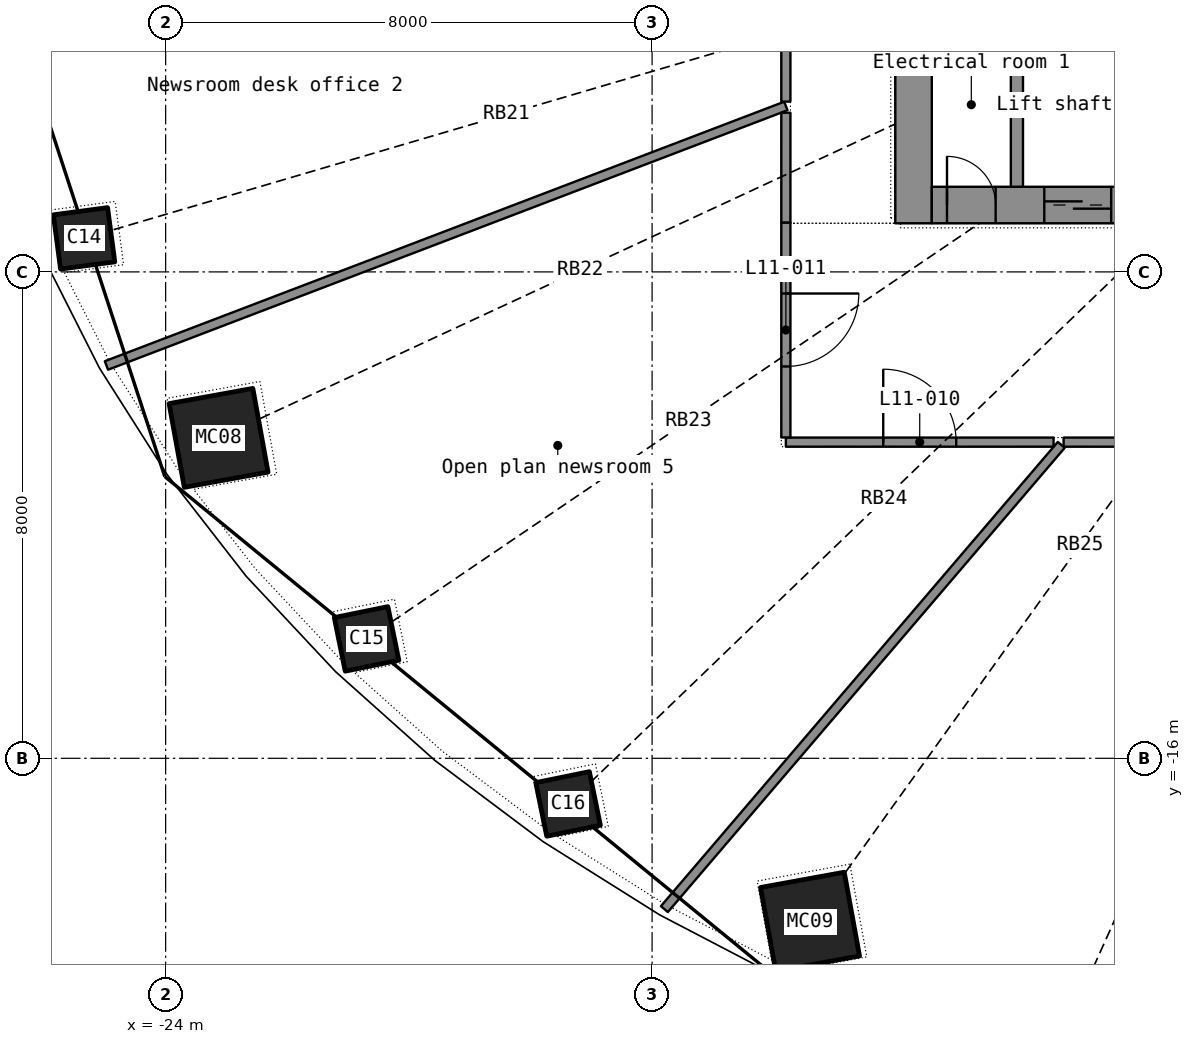
"""IFC4 building model, lengths in metres.
Left out: names, types, materials, properties, quantities, classifications, styles, units other than length and angle.
Written with IfcOpenShell. Run it as: python <this file> out.ifc"""

import sys

from ifc_helpers import new_model, si_unit, direction, frame, frame_2d, origin, origin_2d, place, context, subcontext, project, spatial, rectangle, hollow_rectangle, extrude, element, fill, save


model = new_model("IFC4")
c1 = context("Model", 3, precision=1e-05, world=origin(), true_north=direction((0.0, 1.0)))
c2 = subcontext(c1, "Body", "Model", "MODEL_VIEW")
j1 = project(units=[si_unit("LENGTHUNIT", "METRE"), si_unit("PLANEANGLEUNIT", "RADIAN")], contexts=[c1])
p1 = place(None, origin())
s1 = spatial("IfcSite", under=j1, at=p1, CompositionType="ELEMENT")
p2 = place(p1, origin())
s2 = spatial("IfcBuilding", under=s1, at=p2, CompositionType="ELEMENT")
p3 = place(p2, frame((0.0, 0.0, 51.9)))
s3 = spatial("IfcBuildingStorey", under=s2, at=p3, CompositionType="ELEMENT", Elevation=51.9)
p4 = place(p3, frame((-25.342, -7.448, 0.0), z_axis=(0.032509649, 0.009693546, 0.999424413), x_axis=(-0.409567466, 0.912268859, 0.004474349)))
e1 = element("IfcColumn", 1, at=p4, inside=s3, PredefinedType="COLUMN", context=c2, shape_type="SweptSolid", body=[
    extrude(hollow_rectangle(XDim=0.9, YDim=0.9, WallThickness=0.025, at=origin_2d()), origin(), (0.0, 0.0, 1.0), 3.702),
])
p5 = place(p3, frame((-23.13, -10.73, 0.0), z_axis=(0.029938721, 0.014112084, 0.999452111), x_axis=(-0.581020427, 0.813867496, 0.005912881)))
e2 = element("IfcColumn", 2, at=p5, inside=s3, PredefinedType="COLUMN", context=c2, shape_type="SweptSolid", body=[
    extrude(hollow_rectangle(XDim=1.4, YDim=1.4, WallThickness=0.04, at=origin_2d()), origin(), (0.0, 0.0, 1.0), 3.702),
])
p6 = place(p3, frame((-20.696, -14.036, 0.0), z_axis=(0.026510431, 0.018201192, 0.999482823), x_axis=(-0.719463139, 0.694500807, 0.006435864)))
e3 = element("IfcColumn", 3, at=p6, inside=s3, PredefinedType="COLUMN", context=c2, shape_type="SweptSolid", body=[
    extrude(hollow_rectangle(XDim=0.9, YDim=0.9, WallThickness=0.025, at=origin_2d()), origin(), (0.0, 0.0, 1.0), 3.702),
])
p7 = place(p3, frame((-17.382, -16.751, 0.0), z_axis=(0.02222469, 0.021697101, 0.999517533), x_axis=(-0.827695499, 0.561142971, 0.006223103)))
e4 = element("IfcColumn", 4, at=p7, inside=s3, PredefinedType="COLUMN", context=c2, shape_type="SweptSolid", body=[
    extrude(hollow_rectangle(XDim=0.9, YDim=0.9, WallThickness=0.025, at=origin_2d()), origin(), (0.0, 0.0, 1.0), 3.702),
])
p8 = place(p3, frame((-13.403, -18.688, 0.0), z_axis=(0.017279098, 0.024533681, 0.999549664), x_axis=(-0.907591228, 0.419820395, 0.005385043)))
e5 = element("IfcColumn", 5, at=p8, inside=s3, PredefinedType="COLUMN", context=c2, shape_type="SweptSolid", body=[
    extrude(hollow_rectangle(XDim=1.4, YDim=1.4, WallThickness=0.04, at=origin_2d()), origin(), (0.0, 0.0, 1.0), 3.702),
])
p9 = place(p3, frame((-11.7, -7.2, 0.0), z_axis=(0.0, 0.0, 1.0), x_axis=(0.0, 1.0, 0.0)))
e6 = element("IfcWall", 6, at=p9, inside=s3, PredefinedType="SHEAR", context=c2, shape_type="SweptSolid", body=[
    extrude(rectangle(XDim=14.4, YDim=0.6, at=frame_2d((7.2, 0.0))), origin(), (0.0, 0.0, 1.0), 3.3),
])
p10 = place(p9, frame((6.5, 0.0, 0.0)))
e7 = element("IfcOpeningElement", 7, at=p10, cuts=e6, PredefinedType="OPENING", context=c2, shape_type="SweptSolid", body=[
    extrude(rectangle(XDim=1.4, YDim=2.2, at=frame_2d((0.7, 1.1))), frame((0.0, 0.31, 0.0), z_axis=(0.0, -1.0, 0.0), x_axis=(1.0, 0.0, 0.0)), (0.0, 0.0, 1.0), 0.62),
])
p11 = place(p3, frame((-11.4, -6.9, 0.0), z_axis=(0.0, 0.0, 1.0), x_axis=(1.0, 0.0, 0.0)))
e8 = element("IfcWall", 8, at=p11, inside=s3, PredefinedType="SHEAR", context=c2, shape_type="SweptSolid", body=[
    extrude(rectangle(XDim=22.8, YDim=0.6, at=frame_2d((11.4, 0.0))), origin(), (0.0, 0.0, 1.0), 3.3),
])
p12 = place(p11, frame((1.85, 0.0, 0.0)))
e9 = element("IfcOpeningElement", 9, at=p12, cuts=e8, PredefinedType="OPENING", context=c2, shape_type="SweptSolid", body=[
    extrude(rectangle(XDim=1.1, YDim=2.2, at=frame_2d((0.55, 1.1))), frame((0.0, 0.31, 0.0), z_axis=(0.0, -1.0, 0.0), x_axis=(1.0, 0.0, 0.0)), (0.0, 0.0, 1.0), 0.62),
])
p13 = place(p11, frame((3.85, 0.0, 0.0)))
e10 = element("IfcOpeningElement", 10, at=p13, cuts=e8, PredefinedType="OPENING", context=c2, shape_type="SweptSolid", body=[
    extrude(rectangle(XDim=1.1, YDim=2.2, at=frame_2d((0.55, 1.1))), frame((0.0, 0.31, 0.0), z_axis=(0.0, -1.0, 0.0), x_axis=(1.0, 0.0, 0.0)), (0.0, 0.0, 1.0), 0.62),
])
p14 = place(p11, frame((5.85, 0.0, 0.0)))
e11 = element("IfcOpeningElement", 11, at=p14, cuts=e8, PredefinedType="OPENING", context=c2, shape_type="SweptSolid", body=[
    extrude(rectangle(XDim=1.1, YDim=2.2, at=frame_2d((0.55, 1.1))), frame((0.0, 0.31, 0.0), z_axis=(0.0, -1.0, 0.0), x_axis=(1.0, 0.0, 0.0)), (0.0, 0.0, 1.0), 0.62),
])
p15 = place(p11, frame((7.85, 0.0, 0.0)))
e12 = element("IfcOpeningElement", 12, at=p15, cuts=e8, PredefinedType="OPENING", context=c2, shape_type="SweptSolid", body=[
    extrude(rectangle(XDim=1.1, YDim=2.2, at=frame_2d((0.55, 1.1))), frame((0.0, 0.31, 0.0), z_axis=(0.0, -1.0, 0.0), x_axis=(1.0, 0.0, 0.0)), (0.0, 0.0, 1.0), 0.62),
])
p16 = place(p11, frame((9.85, 0.0, 0.0)))
e13 = element("IfcOpeningElement", 13, at=p16, cuts=e8, PredefinedType="OPENING", context=c2, shape_type="SweptSolid", body=[
    extrude(rectangle(XDim=1.1, YDim=2.2, at=frame_2d((0.55, 1.1))), frame((0.0, 0.31, 0.0), z_axis=(0.0, -1.0, 0.0), x_axis=(1.0, 0.0, 0.0)), (0.0, 0.0, 1.0), 0.62),
])
p17 = place(p11, frame((11.85, 0.0, 0.0)))
e14 = element("IfcOpeningElement", 14, at=p17, cuts=e8, PredefinedType="OPENING", context=c2, shape_type="SweptSolid", body=[
    extrude(rectangle(XDim=1.1, YDim=2.2, at=frame_2d((0.55, 1.1))), frame((0.0, 0.31, 0.0), z_axis=(0.0, -1.0, 0.0), x_axis=(1.0, 0.0, 0.0)), (0.0, 0.0, 1.0), 0.62),
])
p18 = place(p11, frame((13.85, 0.0, 0.0)))
e15 = element("IfcOpeningElement", 15, at=p18, cuts=e8, PredefinedType="OPENING", context=c2, shape_type="SweptSolid", body=[
    extrude(rectangle(XDim=1.1, YDim=2.2, at=frame_2d((0.55, 1.1))), frame((0.0, 0.31, 0.0), z_axis=(0.0, -1.0, 0.0), x_axis=(1.0, 0.0, 0.0)), (0.0, 0.0, 1.0), 0.62),
])
p19 = place(p11, frame((15.85, 0.0, 0.0)))
e16 = element("IfcOpeningElement", 16, at=p19, cuts=e8, PredefinedType="OPENING", context=c2, shape_type="SweptSolid", body=[
    extrude(rectangle(XDim=1.1, YDim=2.2, at=frame_2d((0.55, 1.1))), frame((0.0, 0.31, 0.0), z_axis=(0.0, -1.0, 0.0), x_axis=(1.0, 0.0, 0.0)), (0.0, 0.0, 1.0), 0.62),
])
p20 = place(p11, frame((19.85, 0.0, 0.0)))
e17 = element("IfcOpeningElement", 17, at=p20, cuts=e8, PredefinedType="OPENING", context=c2, shape_type="SweptSolid", body=[
    extrude(rectangle(XDim=1.1, YDim=2.2, at=frame_2d((0.55, 1.1))), frame((0.0, 0.31, 0.0), z_axis=(0.0, -1.0, 0.0), x_axis=(1.0, 0.0, 0.0)), (0.0, 0.0, 1.0), 0.62),
])
p21 = place(p11, frame((0.25, 0.0, 0.0)))
e18 = element("IfcOpeningElement", 18, at=p21, cuts=e8, PredefinedType="OPENING", context=c2, shape_type="SweptSolid", body=[
    extrude(rectangle(XDim=0.8, YDim=2.05, at=frame_2d((0.4, 1.025))), frame((0.0, 0.31, 0.0), z_axis=(0.0, -1.0, 0.0), x_axis=(1.0, 0.0, 0.0)), (0.0, 0.0, 1.0), 0.62),
])
p22 = place(p11, frame((21.75, 0.0, 0.0)))
e19 = element("IfcOpeningElement", 19, at=p22, cuts=e8, PredefinedType="OPENING", context=c2, shape_type="SweptSolid", body=[
    extrude(rectangle(XDim=0.8, YDim=2.05, at=frame_2d((0.4, 1.025))), frame((0.0, 0.31, 0.0), z_axis=(0.0, -1.0, 0.0), x_axis=(1.0, 0.0, 0.0)), (0.0, 0.0, 1.0), 0.62),
])
p23 = place(p3, frame((-10.0, -6.6, 0.0), z_axis=(0.0, 0.0, 1.0), x_axis=(0.0, 1.0, 0.0)))
e20 = element("IfcWall", 20, at=p23, inside=s3, PredefinedType="SHEAR", context=c2, shape_type="SweptSolid", body=[
    extrude(rectangle(XDim=2.7, YDim=0.2, at=frame_2d((1.35, 0.0))), origin(), (0.0, 0.0, 1.0), 3.3),
])
p24 = place(p3, frame((-9.232, -10.8, 0.0), z_axis=(0.0, 0.0, 1.0), x_axis=(1.0, 0.0, 0.0)))
e21 = element("IfcWall", 21, at=p24, inside=s3, PredefinedType="PARTITIONING", context=c2, shape_type="SweptSolid", body=[
    extrude(rectangle(XDim=15.381, YDim=0.15, at=frame_2d((7.69, 0.0))), origin(), (0.0, 0.0, 1.0), 2.4),
])
p25 = place(p24, frame((7.09, 0.0, 0.0)))
e22 = element("IfcOpeningElement", 22, at=p25, cuts=e21, PredefinedType="OPENING", context=c2, shape_type="SweptSolid", body=[
    extrude(rectangle(XDim=1.2, YDim=2.2, at=frame_2d((0.6, 1.1))), frame((0.0, 0.085, 0.0), z_axis=(0.0, -1.0, 0.0), x_axis=(1.0, 0.0, 0.0)), (0.0, 0.0, 1.0), 0.17),
])
p26 = place(p3, frame((-24.974, -9.539, 0.0), z_axis=(0.0, 0.0, 1.0), x_axis=(0.934173736, 0.356818485, 0.0)))
e23 = element("IfcWall", 23, at=p26, inside=s3, PredefinedType="PARTITIONING", context=c2, shape_type="SweptSolid", body=[
    extrude(rectangle(XDim=11.961, YDim=0.15, at=frame_2d((5.981, 0.0))), origin(), (0.0, 0.0, 1.0), 2.4),
])
p27 = place(p3, frame((-15.798, -18.48, 0.0), z_axis=(0.0, 0.0, 1.0), x_axis=(0.649794059, 0.760110308, 0.0)))
e24 = element("IfcWall", 24, at=p27, inside=s3, PredefinedType="PARTITIONING", context=c2, shape_type="SweptSolid", body=[
    extrude(rectangle(XDim=10.045, YDim=0.15, at=frame_2d((5.022, 0.0))), origin(), (0.0, 0.0, 1.0), 2.4),
])
p28 = place(p3, frame((-13.8, -10.8, 0.0), z_axis=(0.0, 0.0, 1.0), x_axis=(1.0, 0.0, 0.0)))
e25 = element("IfcWall", 25, at=p28, inside=s3, PredefinedType="PARTITIONING", context=c2, shape_type="SweptSolid", body=[
    extrude(rectangle(XDim=4.403, YDim=0.15, at=frame_2d((2.202, 0.0))), origin(), (0.0, 0.0, 1.0), 2.4),
])
p29 = place(p28, frame((1.602, 0.0, 0.0)))
e26 = element("IfcOpeningElement", 26, at=p29, cuts=e25, PredefinedType="OPENING", context=c2, shape_type="SweptSolid", body=[
    extrude(rectangle(XDim=1.2, YDim=2.2, at=frame_2d((0.6, 1.1))), frame((0.0, 0.085, 0.0), z_axis=(0.0, -1.0, 0.0), x_axis=(1.0, 0.0, 0.0)), (0.0, 0.0, 1.0), 0.17),
])
p30 = place(p3, frame((-13.8, -1.072, 0.0), z_axis=(0.0, 0.0, 1.0), x_axis=(0.0, -1.0, 0.0)))
e27 = element("IfcWall", 27, at=p30, inside=s3, PredefinedType="PARTITIONING", context=c2, shape_type="SweptSolid", body=[
    extrude(rectangle(XDim=4.127, YDim=0.15, at=frame_2d((2.064, 0.0))), origin(), (0.0, 0.0, 1.0), 2.4),
])
p31 = place(p30, frame((1.464, 0.0, 0.0)))
e28 = element("IfcOpeningElement", 28, at=p31, cuts=e27, PredefinedType="OPENING", context=c2, shape_type="SweptSolid", body=[
    extrude(rectangle(XDim=1.2, YDim=2.2, at=frame_2d((0.6, 1.1))), frame((0.0, 0.085, 0.0), z_axis=(0.0, -1.0, 0.0), x_axis=(1.0, 0.0, 0.0)), (0.0, 0.0, 1.0), 0.17),
])
p32 = place(p3, frame((-13.8, -7.188, 0.0), z_axis=(0.0, 0.0, 1.0), x_axis=(0.0, -1.0, 0.0)))
e29 = element("IfcWall", 29, at=p32, inside=s3, PredefinedType="PARTITIONING", context=c2, shape_type="SweptSolid", body=[
    extrude(rectangle(XDim=3.535, YDim=0.15, at=frame_2d((1.768, 0.0))), origin(), (0.0, 0.0, 1.0), 2.4),
])
p33 = place(p32, frame((1.167, 0.0, 0.0)))
e30 = element("IfcOpeningElement", 30, at=p33, cuts=e29, PredefinedType="OPENING", context=c2, shape_type="SweptSolid", body=[
    extrude(rectangle(XDim=1.2, YDim=2.2, at=frame_2d((0.6, 1.1))), frame((0.0, 0.085, 0.0), z_axis=(0.0, -1.0, 0.0), x_axis=(1.0, 0.0, 0.0)), (0.0, 0.0, 1.0), 0.17),
])
p34 = place(p3, frame((-13.8, -5.382, 0.0), z_axis=(0.0, 0.0, 1.0), x_axis=(0.0, -1.0, 0.0)))
e31 = element("IfcWall", 31, at=p34, inside=s3, PredefinedType="PARTITIONING", context=c2, shape_type="SweptSolid", body=[
    extrude(rectangle(XDim=1.805, YDim=0.15, at=frame_2d((0.902, 0.0))), origin(), (0.0, 0.0, 1.0), 2.4),
])
p35 = place(p12, origin())
e32 = element("IfcDoor", 32, at=p35, inside=s3, OperationType="DOUBLE_DOOR_SLIDING", PredefinedType="DOOR", context=c2, shape_type="SweptSolid", body=[
    extrude(rectangle(XDim=1.1, YDim=2.2, at=frame_2d((0.55, 1.1))), frame((0.0, 0.025, 0.0), z_axis=(0.0, -1.0, 0.0), x_axis=(1.0, 0.0, 0.0)), (0.0, 0.0, 1.0), 0.05),
])
fill(e9, e32)
p36 = place(p21, origin())
e33 = element("IfcDoor", 33, at=p36, inside=s3, OperationType="SINGLE_SWING_LEFT", PredefinedType="DOOR", context=c2, shape_type="SweptSolid", body=[
    extrude(rectangle(XDim=0.8, YDim=2.05, at=frame_2d((0.4, 1.025))), frame((0.0, 0.025, 0.0), z_axis=(0.0, -1.0, 0.0), x_axis=(1.0, 0.0, 0.0)), (0.0, 0.0, 1.0), 0.05),
])
fill(e18, e33)
p37 = place(p29, origin())
e34 = element("IfcDoor", 34, at=p37, inside=s3, OperationType="DOUBLE_DOOR_SINGLE_SWING", PredefinedType="DOOR", context=c2, shape_type="SweptSolid", body=[
    extrude(rectangle(XDim=1.2, YDim=2.2, at=frame_2d((0.6, 1.1))), frame((0.0, 0.025, 0.0), z_axis=(0.0, -1.0, 0.0), x_axis=(1.0, 0.0, 0.0)), (0.0, 0.0, 1.0), 0.05),
])
fill(e26, e34)
p38 = place(p33, origin())
e35 = element("IfcDoor", 35, at=p38, inside=s3, OperationType="DOUBLE_DOOR_SINGLE_SWING", PredefinedType="DOOR", context=c2, shape_type="SweptSolid", body=[
    extrude(rectangle(XDim=1.2, YDim=2.2, at=frame_2d((0.6, 1.1))), frame((0.0, 0.025, 0.0), z_axis=(0.0, -1.0, 0.0), x_axis=(1.0, 0.0, 0.0)), (0.0, 0.0, 1.0), 0.05),
])
fill(e30, e35)
save(model, sys.argv[1])
